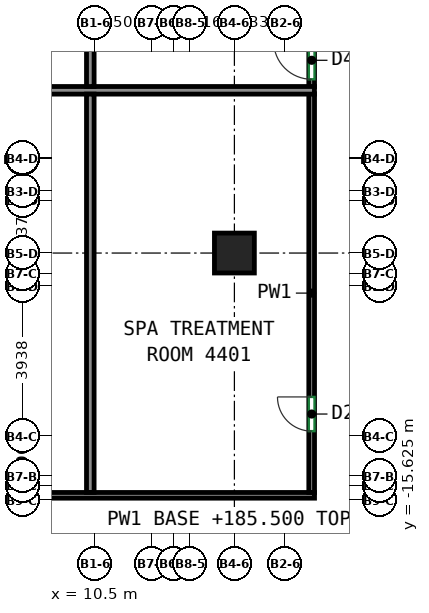
"""IFC4 building model, lengths in metres.
Left out: names, types, materials, properties, quantities, classifications, styles, units other than length and angle.
Written with IfcOpenShell. Run it as: python <this file> out.ifc"""

import sys

from ifc_helpers import new_model, si_unit, direction, frame, frame_2d, origin, origin_2d, place, context, subcontext, project, spatial, rectangle, extrude, source, transform, mapped, element, fill, save


model = new_model("IFC4")
c1 = context("Model", 3, precision=1e-05, world=origin(), true_north=direction((0.0, 1.0)))
c2 = subcontext(c1, "Body", "Model", "MODEL_VIEW")
j1 = project(units=[si_unit("LENGTHUNIT", "METRE"), si_unit("PLANEANGLEUNIT", "RADIAN")], contexts=[c1])
p1 = place(None, origin())
s1 = spatial("IfcSite", under=j1, at=p1, CompositionType="ELEMENT")
p2 = place(p1, origin())
s2 = spatial("IfcBuilding", under=s1, at=p2, CompositionType="ELEMENT")
p3 = place(p2, frame((0.0, 0.0, 185.5)))
s3 = spatial("IfcBuildingStorey", under=s2, at=p3, CompositionType="ELEMENT", Elevation=185.5)
m1 = source(origin(), c2, "Body", "SweptSolid", [
    extrude(rectangle(XDim=1.05, YDim=1.05, at=origin_2d()), origin(), (0.0, 0.0, 1.0), 3.12),
])
p4 = place(p3, frame((14.167, -9.125, 0.0), z_axis=(0.0, 0.0, 1.0), x_axis=(1.0, 0.0, 0.0)))
e1 = element("IfcColumn", 1, at=p4, inside=s3, PredefinedType="COLUMN", context=c2, shape_type="MappedRepresentation", body=[
    mapped(m1, transform((0.0, 0.0, 0.0))),
])
p5 = place(p3, frame((16.2, -4.753, 0.0), z_axis=(0.0, 0.0, 1.0), x_axis=(0.0, 1.0, 0.0)))
e2 = element("IfcWall", 2, at=p5, inside=s3, PredefinedType="PARTITIONING", context=c2, shape_type="SweptSolid", body=[
    extrude(rectangle(XDim=8.378, YDim=0.15, at=frame_2d((4.189, 0.0))), origin(), (0.0, 0.0, 1.0), 3.12),
])
p6 = place(p5, frame((0.2, 0.0, 0.0)))
e3 = element("IfcOpeningElement", 3, at=p6, cuts=e2, PredefinedType="OPENING", context=c2, shape_type="SweptSolid", body=[
    extrude(rectangle(XDim=1.0, YDim=2.1, at=frame_2d((0.5, 1.05))), frame((0.0, 0.085, 0.0), z_axis=(0.0, -1.0, 0.0), x_axis=(1.0, 0.0, 0.0)), (0.0, 0.0, 1.0), 0.17),
])
p7 = place(p3, frame((-4.802, -15.5, 0.0), z_axis=(0.0, 0.0, 1.0), x_axis=(1.0, 0.0, 0.0)))
e4 = element("IfcWall", 4, at=p7, inside=s3, PredefinedType="PARTITIONING", context=c2, shape_type="SweptSolid", body=[
    extrude(rectangle(XDim=21.077, YDim=0.15, at=frame_2d((10.539, 0.0))), origin(), (0.0, 0.0, 1.0), 3.12),
])
p8 = place(p7, frame((6.372, 0.0, 0.0)))
e5 = element("IfcOpeningElement", 5, at=p8, cuts=e4, PredefinedType="OPENING", context=c2, shape_type="SweptSolid", body=[
    extrude(rectangle(XDim=0.9, YDim=2.1, at=frame_2d((0.45, 1.05))), frame((0.0, 0.085, 0.0), z_axis=(0.0, -1.0, 0.0), x_axis=(1.0, 0.0, 0.0)), (0.0, 0.0, 1.0), 0.17),
])
p9 = place(p7, frame((7.815, 0.0, 0.0)))
e6 = element("IfcOpeningElement", 6, at=p9, cuts=e4, PredefinedType="OPENING", context=c2, shape_type="SweptSolid", body=[
    extrude(rectangle(XDim=0.9, YDim=2.1, at=frame_2d((0.45, 1.05))), frame((0.0, 0.085, 0.0), z_axis=(0.0, -1.0, 0.0), x_axis=(1.0, 0.0, 0.0)), (0.0, 0.0, 1.0), 0.17),
])
p10 = place(p3, frame((16.2, -15.425, 0.0), z_axis=(0.0, 0.0, 1.0), x_axis=(0.0, 1.0, 0.0)))
e7 = element("IfcWall", 7, at=p10, inside=s3, PredefinedType="PARTITIONING", context=c2, shape_type="SweptSolid", body=[
    extrude(rectangle(XDim=10.492, YDim=0.15, at=frame_2d((5.246, 0.0))), origin(), (0.0, 0.0, 1.0), 3.12),
])
p11 = place(p10, frame((1.614, 0.0, 0.0)))
e8 = element("IfcOpeningElement", 8, at=p11, cuts=e7, PredefinedType="OPENING", context=c2, shape_type="SweptSolid", body=[
    extrude(rectangle(XDim=0.9, YDim=2.1, at=frame_2d((0.45, 1.05))), frame((0.0, 0.085, 0.0), z_axis=(0.0, -1.0, 0.0), x_axis=(1.0, 0.0, 0.0)), (0.0, 0.0, 1.0), 0.17),
])
p12 = place(p3, frame((-13.873, -4.843, 0.0), z_axis=(0.0, 0.0, 1.0), x_axis=(1.0, 0.0, 0.0)))
e9 = element("IfcWall", 9, at=p12, inside=s3, PredefinedType="PARTITIONING", context=c2, shape_type="SweptSolid", body=[
    extrude(rectangle(XDim=30.146, YDim=0.2, at=frame_2d((15.073, 0.0))), origin(), (0.0, 0.0, 1.0), 3.12),
])
p13 = place(p3, frame((10.375, -4.743, 0.0), z_axis=(0.0, 0.0, 1.0), x_axis=(0.0, 1.0, 0.0)))
e10 = element("IfcWall", 10, at=p13, inside=s3, PredefinedType="PARTITIONING", context=c2, shape_type="SweptSolid", body=[
    extrude(rectangle(XDim=8.366, YDim=0.2, at=frame_2d((4.183, 0.0))), origin(), (0.0, 0.0, 1.0), 3.12),
])
p14 = place(p3, frame((10.375, -15.423, 0.0), z_axis=(0.0, 0.0, 1.0), x_axis=(0.0, 1.0, 0.0)))
e11 = element("IfcWall", 11, at=p14, inside=s3, PredefinedType="PARTITIONING", context=c2, shape_type="SweptSolid", body=[
    extrude(rectangle(XDim=10.48, YDim=0.2, at=frame_2d((5.24, 0.0))), origin(), (0.0, 0.0, 1.0), 3.12),
])
p15 = place(p11, origin())
e12 = element("IfcDoor", 12, at=p15, inside=s3, OperationType="SINGLE_SWING_RIGHT", PredefinedType="DOOR", context=c2, shape_type="SweptSolid", body=[
    extrude(rectangle(XDim=0.9, YDim=2.1, at=frame_2d((0.45, 1.05))), frame((0.0, 0.025, 0.0), z_axis=(0.0, -1.0, 0.0), x_axis=(1.0, 0.0, 0.0)), (0.0, 0.0, 1.0), 0.05),
])
fill(e8, e12)
p16 = place(p6, origin())
e13 = element("IfcDoor", 13, at=p16, inside=s3, OperationType="SINGLE_SWING_RIGHT", PredefinedType="DOOR", context=c2, shape_type="SweptSolid", body=[
    extrude(rectangle(XDim=1.0, YDim=2.1, at=frame_2d((0.5, 1.05))), frame((0.0, 0.025, 0.0), z_axis=(0.0, -1.0, 0.0), x_axis=(1.0, 0.0, 0.0)), (0.0, 0.0, 1.0), 0.05),
])
fill(e3, e13)
save(model, sys.argv[1])
